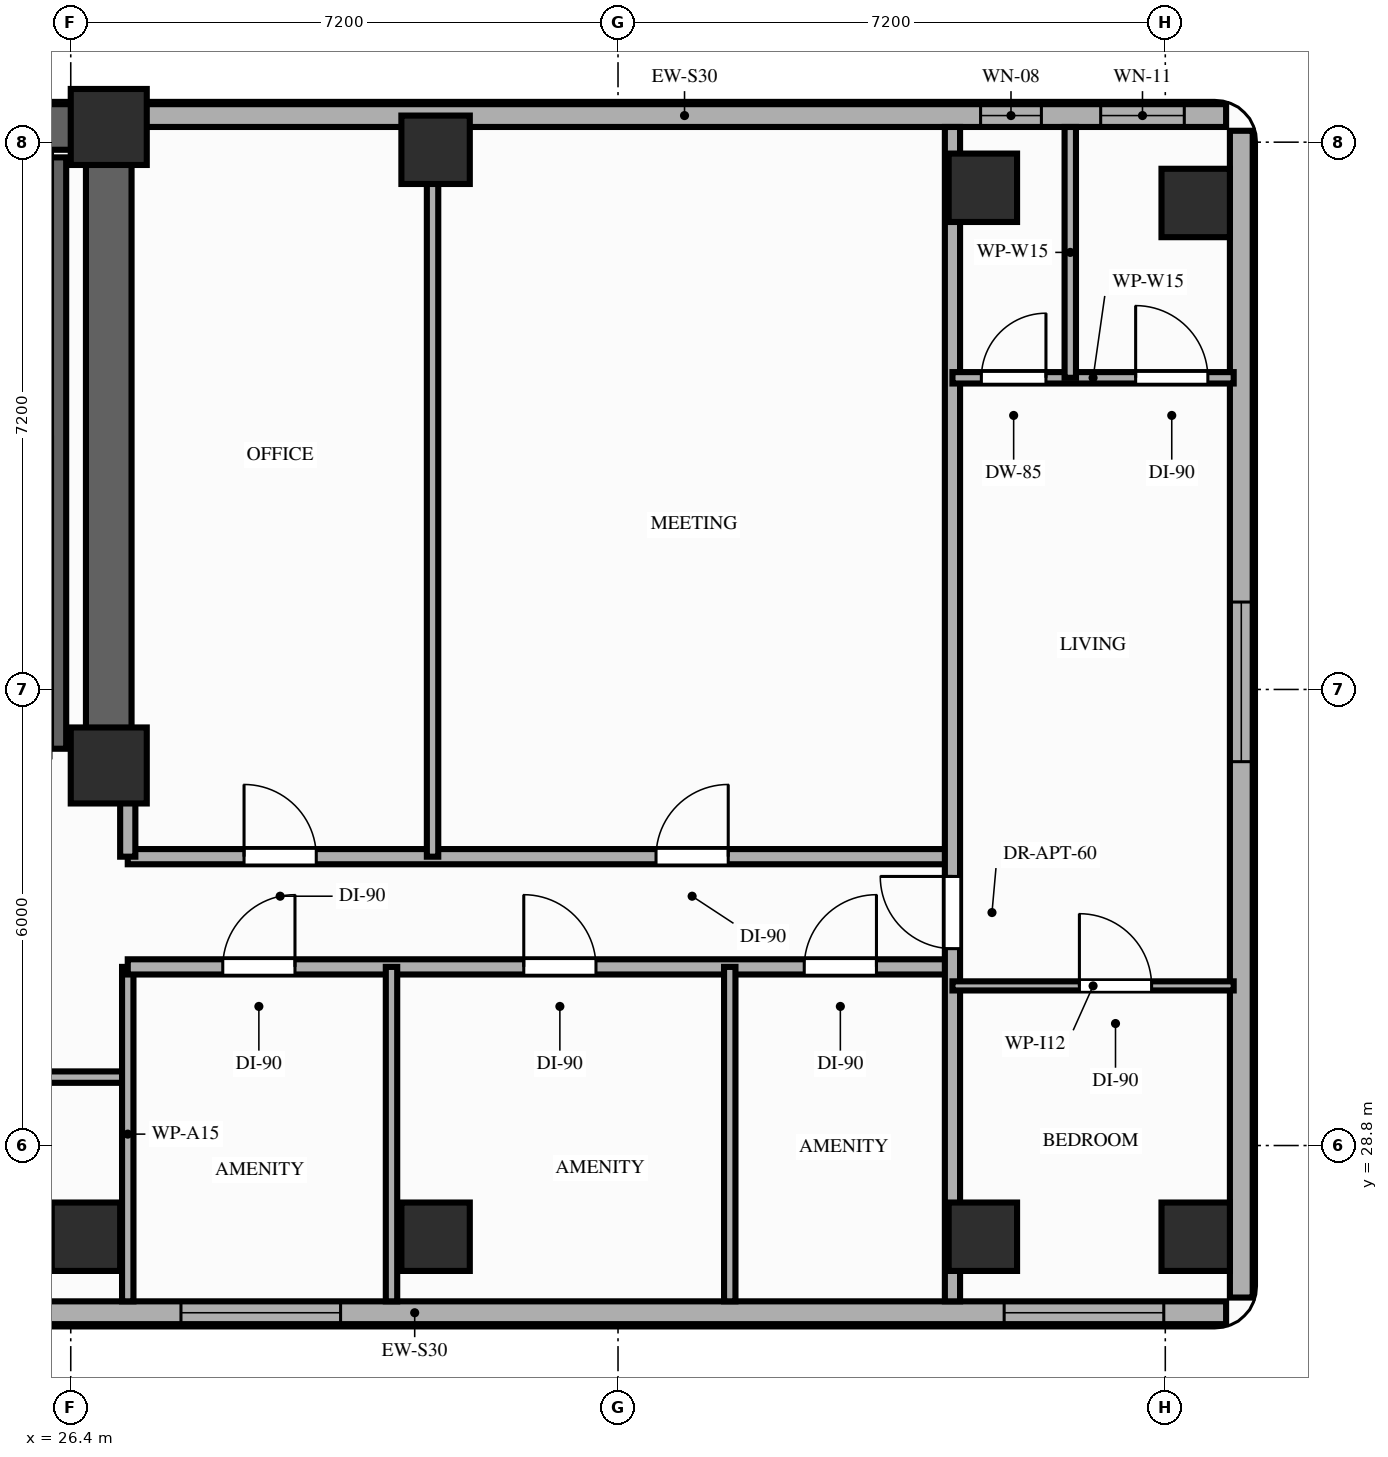
"""IFC4 building model, lengths in metres.
Left out: names, types, materials, properties, quantities, classifications, styles, units other than length and angle.
Written with IfcOpenShell. Run it as: python <this file> out.ifc"""

import sys

from ifc_helpers import new_model, si_unit, direction, frame, frame_2d, origin, origin_2d, place, context, subcontext, project, spatial, rectangle, extrude, element, fill, save


model = new_model("IFC4")
c1 = context("Model", 3, precision=1e-05, world=origin(), true_north=direction((0.0, 1.0)))
c2 = subcontext(c1, "Body", "Model", "MODEL_VIEW")
j1 = project(units=[si_unit("LENGTHUNIT", "METRE"), si_unit("PLANEANGLEUNIT", "RADIAN")], contexts=[c1])
p1 = place(None, origin())
s1 = spatial("IfcSite", under=j1, at=p1, CompositionType="ELEMENT")
p2 = place(p1, origin())
s2 = spatial("IfcBuilding", under=s1, at=p2, CompositionType="ELEMENT")
p3 = place(p2, frame((0.0, 0.0, 182.4)))
s3 = spatial("IfcBuildingStorey", under=s2, at=p3, CompositionType="ELEMENT", Elevation=182.4)
for number, where, z_axis, x_axis in (
    (1, (26.9, 33.8, 0.0), (0.0, 0.0, 1.0), (1.0, 0.0, 0.0)),
    (2, (26.9, 42.2, 0.0), (0.0, 0.0, 1.0), (1.0, 0.0, 0.0)),
):
    element("IfcColumn", number, at=place(p3, frame(where, z_axis=z_axis, x_axis=x_axis)), inside=s3, PredefinedType="COLUMN", context=c2, shape_type="SweptSolid", body=[
        extrude(rectangle(XDim=1.0, YDim=1.0, at=origin_2d()), origin(), (0.0, 0.0, 1.0), 3.2),
    ])
for number, where, z_axis, x_axis in (
    (3, (26.6, 27.6, 0.0), (0.0, 0.0, 1.0), (1.0, 0.0, 0.0)),
    (4, (31.2, 27.6, 0.0), (0.0, 0.0, 1.0), (1.0, 0.0, 0.0)),
    (5, (31.2, 41.9, 0.0), (0.0, 0.0, 1.0), (1.0, 0.0, 0.0)),
    (6, (38.4, 27.6, 0.0), (0.0, 0.0, 1.0), (1.0, 0.0, 0.0)),
    (7, (38.4, 41.4, 0.0), (0.0, 0.0, 1.0), (1.0, 0.0, 0.0)),
    (8, (41.2, 27.6, 0.0), (0.0, 0.0, 1.0), (1.0, 0.0, 0.0)),
    (9, (41.2, 41.2, 0.0), (0.0, 0.0, 1.0), (1.0, 0.0, 0.0)),
):
    element("IfcColumn", number, at=place(p3, frame(where, z_axis=z_axis, x_axis=x_axis)), inside=s3, PredefinedType="COLUMN", context=c2, shape_type="SweptSolid", body=[
        extrude(rectangle(XDim=0.9, YDim=0.9, at=origin_2d()), origin(), (0.0, 0.0, 1.0), 3.2),
    ])
p4 = place(p3, frame((41.6, 42.35, 0.0), z_axis=(0.0, 0.0, 1.0), x_axis=(-1.0, 0.0, 0.0)))
e10 = element("IfcWall", 10, at=p4, inside=s3, PredefinedType="STANDARD", context=c2, shape_type="SweptSolid", body=[
    extrude(rectangle(XDim=14.25, YDim=0.3, at=frame_2d((7.125, 0.0))), origin(), (0.0, 0.0, 1.0), 2.45),
])
p5 = place(p4, frame((2.43, 0.0, 0.85)))
e11 = element("IfcOpeningElement", 11, at=p5, cuts=e10, PredefinedType="OPENING", context=c2, shape_type="SweptSolid", body=[
    extrude(rectangle(XDim=0.8, YDim=1.35, at=frame_2d((0.4, 0.675))), frame((0.0, 0.16, 0.0), z_axis=(0.0, -1.0, 0.0), x_axis=(1.0, 0.0, 0.0)), (0.0, 0.0, 1.0), 0.32),
])
p6 = place(p4, frame((0.55, 0.0, 0.85)))
e12 = element("IfcOpeningElement", 12, at=p6, cuts=e10, PredefinedType="OPENING", context=c2, shape_type="SweptSolid", body=[
    extrude(rectangle(XDim=1.1, YDim=1.35, at=frame_2d((0.55, 0.675))), frame((0.0, 0.16, 0.0), z_axis=(0.0, -1.0, 0.0), x_axis=(1.0, 0.0, 0.0)), (0.0, 0.0, 1.0), 0.32),
])
p7 = place(p3, frame((20.25, 26.6, 0.0), z_axis=(0.0, 0.0, 1.0), x_axis=(1.0, 0.0, 0.0)))
e13 = element("IfcWall", 13, at=p7, inside=s3, PredefinedType="STANDARD", context=c2, shape_type="SweptSolid", body=[
    extrude(rectangle(XDim=21.35, YDim=0.3, at=frame_2d((10.675, 0.0))), origin(), (0.0, 0.0, 1.0), 2.71),
])
p8 = place(p7, frame((18.43, 0.0, 0.85)))
e14 = element("IfcOpeningElement", 14, at=p8, cuts=e13, PredefinedType="OPENING", context=c2, shape_type="SweptSolid", body=[
    extrude(rectangle(XDim=2.1, YDim=1.61, at=frame_2d((1.05, 0.805))), frame((0.0, 0.16, 0.0), z_axis=(0.0, -1.0, 0.0), x_axis=(1.0, 0.0, 0.0)), (0.0, 0.0, 1.0), 0.32),
])
p9 = place(p7, frame((2.1, 0.0, 0.85)))
e15 = element("IfcOpeningElement", 15, at=p9, cuts=e13, PredefinedType="OPENING", context=c2, shape_type="SweptSolid", body=[
    extrude(rectangle(XDim=2.1, YDim=1.61, at=frame_2d((1.05, 0.805))), frame((0.0, 0.16, 0.0), z_axis=(0.0, -1.0, 0.0), x_axis=(1.0, 0.0, 0.0)), (0.0, 0.0, 1.0), 0.32),
])
p10 = place(p7, frame((7.6, 0.0, 0.85)))
e16 = element("IfcOpeningElement", 16, at=p10, cuts=e13, PredefinedType="OPENING", context=c2, shape_type="SweptSolid", body=[
    extrude(rectangle(XDim=2.1, YDim=1.61, at=frame_2d((1.05, 0.805))), frame((0.0, 0.16, 0.0), z_axis=(0.0, -1.0, 0.0), x_axis=(1.0, 0.0, 0.0)), (0.0, 0.0, 1.0), 0.32),
])
p11 = place(p3, frame((41.8, 26.8, 0.0), z_axis=(0.0, 0.0, 1.0), x_axis=(0.0, 1.0, 0.0)))
e17 = element("IfcWall", 17, at=p11, inside=s3, PredefinedType="STANDARD", context=c2, shape_type="SweptSolid", body=[
    extrude(rectangle(XDim=15.35, YDim=0.3, at=frame_2d((7.675, 0.0))), origin(), (0.0, 0.0, 1.0), 3.02),
])
p12 = place(p11, frame((7.05, 0.0, 0.85)))
e18 = element("IfcOpeningElement", 18, at=p12, cuts=e17, PredefinedType="OPENING", context=c2, shape_type="SweptSolid", body=[
    extrude(rectangle(XDim=2.1, YDim=1.8, at=frame_2d((1.05, 0.9))), frame((0.0, 0.16, 0.0), z_axis=(0.0, -1.0, 0.0), x_axis=(1.0, 0.0, 0.0)), (0.0, 0.0, 1.0), 0.32),
])
p13 = place(p3, frame((6.45, 42.2, 0.0), z_axis=(0.0, 0.0, 1.0), x_axis=(1.0, 0.0, 0.0)))
e19 = element("IfcWall", 19, at=p13, inside=s3, PredefinedType="SHEAR", context=c2, shape_type="SweptSolid", body=[
    extrude(rectangle(XDim=20.45, YDim=0.6, at=frame_2d((10.225, 0.0))), origin(), (0.0, 0.0, 1.0), 3.02),
])
p14 = place(p3, frame((26.9, 33.8, 0.0), z_axis=(0.0, 0.0, 1.0), x_axis=(0.0, 1.0, 0.0)))
e20 = element("IfcWall", 20, at=p14, inside=s3, PredefinedType="SHEAR", context=c2, shape_type="SweptSolid", body=[
    extrude(rectangle(XDim=7.95, YDim=0.6, at=frame_2d((3.975, 0.0))), origin(), (0.0, 0.0, 1.0), 3.02),
])
p15 = place(p3, frame((26.24, 34.02, 0.0), z_axis=(0.0, 0.0, 1.0), x_axis=(0.0, 1.0, 0.0)))
e21 = element("IfcWall", 21, at=p15, inside=s3, PredefinedType="SHEAR", context=c2, shape_type="SweptSolid", body=[
    extrude(rectangle(XDim=7.78, YDim=0.2, at=frame_2d((3.89, 0.0))), origin(), (0.0, 0.0, 1.0), 3.02),
])
p16 = place(p3, frame((20.45, 29.7, 0.0), z_axis=(0.0, 0.0, 1.0), x_axis=(1.0, 0.0, 0.0)))
e22 = element("IfcWall", 22, at=p16, inside=s3, PredefinedType="PARTITIONING", context=c2, shape_type="SweptSolid", body=[
    extrude(rectangle(XDim=6.7, YDim=0.15, at=frame_2d((3.35, 0.0))), origin(), (0.0, 0.0, 1.0), 3.02),
])
p17 = place(p16, frame((2.8, 0.0, 0.0)))
e23 = element("IfcOpeningElement", 23, at=p17, cuts=e22, PredefinedType="OPENING", context=c2, shape_type="SweptSolid", body=[
    extrude(rectangle(XDim=0.95, YDim=2.15, at=frame_2d((0.475, 1.075))), frame((0.0, 0.085, 0.0), z_axis=(0.0, -1.0, 0.0), x_axis=(1.0, 0.0, 0.0)), (0.0, 0.0, 1.0), 0.17),
])
p18 = place(p3, frame((27.15, 26.75, 0.0), z_axis=(0.0, 0.0, 1.0), x_axis=(0.0, 1.0, 0.0)))
e24 = element("IfcWall", 24, at=p18, inside=s3, PredefinedType="PARTITIONING", context=c2, shape_type="SweptSolid", body=[
    extrude(rectangle(XDim=4.4, YDim=0.15, at=frame_2d((2.2, 0.0))), origin(), (0.0, 0.0, 1.0), 2.45),
])
p19 = place(p3, frame((27.15, 31.15, 0.0), z_axis=(0.0, 0.0, 1.0), x_axis=(1.0, 0.0, 0.0)))
e25 = element("IfcWall", 25, at=p19, inside=s3, PredefinedType="PARTITIONING", context=c2, shape_type="SweptSolid", body=[
    extrude(rectangle(XDim=10.85, YDim=0.2, at=frame_2d((5.425, 0.0))), origin(), (0.0, 0.0, 1.0), 2.45),
])
p20 = place(p19, frame((1.25, 0.0, 0.0)))
e26 = element("IfcOpeningElement", 26, at=p20, cuts=e25, PredefinedType="OPENING", context=c2, shape_type="SweptSolid", body=[
    extrude(rectangle(XDim=0.95, YDim=2.15, at=frame_2d((0.475, 1.075))), frame((0.0, 0.11, 0.0), z_axis=(0.0, -1.0, 0.0), x_axis=(1.0, 0.0, 0.0)), (0.0, 0.0, 1.0), 0.22),
])
p21 = place(p19, frame((5.21, 0.0, 0.0)))
e27 = element("IfcOpeningElement", 27, at=p21, cuts=e25, PredefinedType="OPENING", context=c2, shape_type="SweptSolid", body=[
    extrude(rectangle(XDim=0.95, YDim=2.15, at=frame_2d((0.475, 1.075))), frame((0.0, 0.11, 0.0), z_axis=(0.0, -1.0, 0.0), x_axis=(1.0, 0.0, 0.0)), (0.0, 0.0, 1.0), 0.22),
])
p22 = place(p19, frame((8.9, 0.0, 0.0)))
e28 = element("IfcOpeningElement", 28, at=p22, cuts=e25, PredefinedType="OPENING", context=c2, shape_type="SweptSolid", body=[
    extrude(rectangle(XDim=0.95, YDim=2.15, at=frame_2d((0.475, 1.075))), frame((0.0, 0.11, 0.0), z_axis=(0.0, -1.0, 0.0), x_axis=(1.0, 0.0, 0.0)), (0.0, 0.0, 1.0), 0.22),
])
p23 = place(p3, frame((27.15, 32.6, 0.0), z_axis=(0.0, 0.0, 1.0), x_axis=(1.0, 0.0, 0.0)))
e29 = element("IfcWall", 29, at=p23, inside=s3, PredefinedType="PARTITIONING", context=c2, shape_type="SweptSolid", body=[
    extrude(rectangle(XDim=10.85, YDim=0.2, at=frame_2d((5.425, 0.0))), origin(), (0.0, 0.0, 1.0), 2.45),
])
p24 = place(p23, frame((1.53, 0.0, 0.0)))
e30 = element("IfcOpeningElement", 30, at=p24, cuts=e29, PredefinedType="OPENING", context=c2, shape_type="SweptSolid", body=[
    extrude(rectangle(XDim=0.95, YDim=2.15, at=frame_2d((0.475, 1.075))), frame((0.0, 0.11, 0.0), z_axis=(0.0, -1.0, 0.0), x_axis=(1.0, 0.0, 0.0)), (0.0, 0.0, 1.0), 0.22),
])
p25 = place(p23, frame((6.95, 0.0, 0.0)))
e31 = element("IfcOpeningElement", 31, at=p25, cuts=e29, PredefinedType="OPENING", context=c2, shape_type="SweptSolid", body=[
    extrude(rectangle(XDim=0.95, YDim=2.15, at=frame_2d((0.475, 1.075))), frame((0.0, 0.11, 0.0), z_axis=(0.0, -1.0, 0.0), x_axis=(1.0, 0.0, 0.0)), (0.0, 0.0, 1.0), 0.22),
])
p26 = place(p3, frame((27.15, 32.6, 0.0), z_axis=(0.0, 0.0, 1.0), x_axis=(0.0, 1.0, 0.0)))
e32 = element("IfcWall", 32, at=p26, inside=s3, PredefinedType="PARTITIONING", context=c2, shape_type="SweptSolid", body=[
    extrude(rectangle(XDim=1.08, YDim=0.2, at=frame_2d((0.54, 0.0))), origin(), (0.0, 0.0, 1.0), 2.45),
])
p27 = place(p3, frame((38.0, 26.75, 0.0), z_axis=(0.0, 0.0, 1.0), x_axis=(0.0, 1.0, 0.0)))
e33 = element("IfcWall", 33, at=p27, inside=s3, PredefinedType="PARTITIONING", context=c2, shape_type="SweptSolid", body=[
    extrude(rectangle(XDim=15.45, YDim=0.2, at=frame_2d((7.725, 0.0))), origin(), (0.0, 0.0, 1.0), 2.45),
])
p28 = place(p27, frame((4.64, 0.0, 0.0)))
e34 = element("IfcOpeningElement", 34, at=p28, cuts=e33, PredefinedType="OPENING", context=c2, shape_type="SweptSolid", body=[
    extrude(rectangle(XDim=0.95, YDim=2.15, at=frame_2d((0.475, 1.075))), frame((0.0, 0.11, 0.0), z_axis=(0.0, -1.0, 0.0), x_axis=(1.0, 0.0, 0.0)), (0.0, 0.0, 1.0), 0.22),
])
p29 = place(p3, frame((38.0, 30.9, 0.0), z_axis=(0.0, 0.0, 1.0), x_axis=(1.0, 0.0, 0.0)))
e35 = element("IfcWall", 35, at=p29, inside=s3, PredefinedType="PARTITIONING", context=c2, shape_type="SweptSolid", body=[
    extrude(rectangle(XDim=3.7, YDim=0.12, at=frame_2d((1.85, 0.0))), origin(), (0.0, 0.0, 1.0), 2.45),
])
p30 = place(p29, frame((1.67, 0.0, 0.0)))
e36 = element("IfcOpeningElement", 36, at=p30, cuts=e35, PredefinedType="OPENING", context=c2, shape_type="SweptSolid", body=[
    extrude(rectangle(XDim=0.95, YDim=2.15, at=frame_2d((0.475, 1.075))), frame((0.0, 0.07, 0.0), z_axis=(0.0, -1.0, 0.0), x_axis=(1.0, 0.0, 0.0)), (0.0, 0.0, 1.0), 0.14),
])
p31 = place(p3, frame((38.0, 38.9, 0.0), z_axis=(0.0, 0.0, 1.0), x_axis=(1.0, 0.0, 0.0)))
e37 = element("IfcWall", 37, at=p31, inside=s3, PredefinedType="PARTITIONING", context=c2, shape_type="SweptSolid", body=[
    extrude(rectangle(XDim=3.7, YDim=0.15, at=frame_2d((1.85, 0.0))), origin(), (0.0, 0.0, 1.0), 2.45),
])
p32 = place(p31, frame((0.38, 0.0, 0.0)))
e38 = element("IfcOpeningElement", 38, at=p32, cuts=e37, PredefinedType="OPENING", context=c2, shape_type="SweptSolid", body=[
    extrude(rectangle(XDim=0.85, YDim=2.1, at=frame_2d((0.425, 1.05))), frame((0.0, 0.085, 0.0), z_axis=(0.0, -1.0, 0.0), x_axis=(1.0, 0.0, 0.0)), (0.0, 0.0, 1.0), 0.17),
])
p33 = place(p31, frame((2.41, 0.0, 0.0)))
e39 = element("IfcOpeningElement", 39, at=p33, cuts=e37, PredefinedType="OPENING", context=c2, shape_type="SweptSolid", body=[
    extrude(rectangle(XDim=0.95, YDim=2.15, at=frame_2d((0.475, 1.075))), frame((0.0, 0.085, 0.0), z_axis=(0.0, -1.0, 0.0), x_axis=(1.0, 0.0, 0.0)), (0.0, 0.0, 1.0), 0.17),
])
p34 = place(p3, frame((39.55, 38.9, 0.0), z_axis=(0.0, 0.0, 1.0), x_axis=(0.0, 1.0, 0.0)))
e40 = element("IfcWall", 40, at=p34, inside=s3, PredefinedType="PARTITIONING", context=c2, shape_type="SweptSolid", body=[
    extrude(rectangle(XDim=3.3, YDim=0.15, at=frame_2d((1.65, 0.0))), origin(), (0.0, 0.0, 1.0), 2.45),
])
for number, where, z_axis, x_axis in (
    (41, (30.62, 26.75, 0.0), (0.0, 0.0, 1.0), (0.0, 1.0, 0.0)),
    (42, (35.07, 26.75, 0.0), (0.0, 0.0, 1.0), (0.0, 1.0, 0.0)),
):
    element("IfcWall", number, at=place(p3, frame(where, z_axis=z_axis, x_axis=x_axis)), inside=s3, PredefinedType="PARTITIONING", context=c2, shape_type="SweptSolid", body=[
        extrude(rectangle(XDim=4.4, YDim=0.15, at=frame_2d((2.2, 0.0))), origin(), (0.0, 0.0, 1.0), 2.45),
    ])
p35 = place(p3, frame((31.16, 32.6, 0.0), z_axis=(0.0, 0.0, 1.0), x_axis=(0.0, 1.0, 0.0)))
e43 = element("IfcWall", 43, at=p35, inside=s3, PredefinedType="PARTITIONING", context=c2, shape_type="SweptSolid", body=[
    extrude(rectangle(XDim=9.6, YDim=0.15, at=frame_2d((4.8, 0.0))), origin(), (0.0, 0.0, 1.0), 2.45),
])
p36 = place(p12, origin())
e44 = element("IfcWindow", 44, at=p36, inside=s3, PartitioningType="SINGLE_PANEL", PredefinedType="WINDOW", context=c2, shape_type="SweptSolid", body=[
    extrude(rectangle(XDim=2.1, YDim=1.8, at=frame_2d((1.05, 0.9))), frame((0.0, 0.03, 0.0), z_axis=(0.0, -1.0, 0.0), x_axis=(1.0, 0.0, 0.0)), (0.0, 0.0, 1.0), 0.06),
])
fill(e18, e44)
p37 = place(p8, origin())
e45 = element("IfcWindow", 45, at=p37, inside=s3, PartitioningType="SINGLE_PANEL", PredefinedType="WINDOW", context=c2, shape_type="SweptSolid", body=[
    extrude(rectangle(XDim=2.1, YDim=1.61, at=frame_2d((1.05, 0.805))), frame((0.0, 0.03, 0.0), z_axis=(0.0, -1.0, 0.0), x_axis=(1.0, 0.0, 0.0)), (0.0, 0.0, 1.0), 0.06),
])
fill(e14, e45)
p38 = place(p5, origin())
e46 = element("IfcWindow", 46, at=p38, inside=s3, PartitioningType="SINGLE_PANEL", PredefinedType="WINDOW", context=c2, shape_type="SweptSolid", body=[
    extrude(rectangle(XDim=0.8, YDim=1.35, at=frame_2d((0.4, 0.675))), frame((0.0, 0.03, 0.0), z_axis=(0.0, -1.0, 0.0), x_axis=(1.0, 0.0, 0.0)), (0.0, 0.0, 1.0), 0.06),
])
fill(e11, e46)
p39 = place(p6, origin())
e47 = element("IfcWindow", 47, at=p39, inside=s3, PartitioningType="SINGLE_PANEL", PredefinedType="WINDOW", context=c2, shape_type="SweptSolid", body=[
    extrude(rectangle(XDim=1.1, YDim=1.35, at=frame_2d((0.55, 0.675))), frame((0.0, 0.03, 0.0), z_axis=(0.0, -1.0, 0.0), x_axis=(1.0, 0.0, 0.0)), (0.0, 0.0, 1.0), 0.06),
])
fill(e12, e47)
p40 = place(p10, origin())
e48 = element("IfcWindow", 48, at=p40, inside=s3, PartitioningType="SINGLE_PANEL", PredefinedType="WINDOW", context=c2, shape_type="SweptSolid", body=[
    extrude(rectangle(XDim=2.1, YDim=1.61, at=frame_2d((1.05, 0.805))), frame((0.0, 0.03, 0.0), z_axis=(0.0, -1.0, 0.0), x_axis=(1.0, 0.0, 0.0)), (0.0, 0.0, 1.0), 0.06),
])
fill(e16, e48)
p41 = place(p28, origin())
e49 = element("IfcDoor", 49, at=p41, inside=s3, OperationType="SINGLE_SWING_RIGHT", PredefinedType="DOOR", context=c2, shape_type="SweptSolid", body=[
    extrude(rectangle(XDim=0.95, YDim=2.15, at=frame_2d((0.475, 1.075))), frame((0.0, 0.025, 0.0), z_axis=(0.0, -1.0, 0.0), x_axis=(1.0, 0.0, 0.0)), (0.0, 0.0, 1.0), 0.05),
])
fill(e34, e49)
p42 = place(p30, origin())
e50 = element("IfcDoor", 50, at=p42, inside=s3, OperationType="SINGLE_SWING_LEFT", PredefinedType="DOOR", context=c2, shape_type="SweptSolid", body=[
    extrude(rectangle(XDim=0.95, YDim=2.15, at=frame_2d((0.475, 1.075))), frame((0.0, 0.025, 0.0), z_axis=(0.0, -1.0, 0.0), x_axis=(1.0, 0.0, 0.0)), (0.0, 0.0, 1.0), 0.05),
])
fill(e36, e50)
p43 = place(p32, origin())
e51 = element("IfcDoor", 51, at=p43, inside=s3, OperationType="SINGLE_SWING_RIGHT", PredefinedType="DOOR", context=c2, shape_type="SweptSolid", body=[
    extrude(rectangle(XDim=0.85, YDim=2.1, at=frame_2d((0.425, 1.05))), frame((0.0, 0.025, 0.0), z_axis=(0.0, -1.0, 0.0), x_axis=(1.0, 0.0, 0.0)), (0.0, 0.0, 1.0), 0.05),
])
fill(e38, e51)
p44 = place(p33, origin())
e52 = element("IfcDoor", 52, at=p44, inside=s3, OperationType="SINGLE_SWING_LEFT", PredefinedType="DOOR", context=c2, shape_type="SweptSolid", body=[
    extrude(rectangle(XDim=0.95, YDim=2.15, at=frame_2d((0.475, 1.075))), frame((0.0, 0.025, 0.0), z_axis=(0.0, -1.0, 0.0), x_axis=(1.0, 0.0, 0.0)), (0.0, 0.0, 1.0), 0.05),
])
fill(e39, e52)
p45 = place(p20, origin())
e53 = element("IfcDoor", 53, at=p45, inside=s3, OperationType="SINGLE_SWING_RIGHT", PredefinedType="DOOR", context=c2, shape_type="SweptSolid", body=[
    extrude(rectangle(XDim=0.95, YDim=2.15, at=frame_2d((0.475, 1.075))), frame((0.0, 0.025, 0.0), z_axis=(0.0, -1.0, 0.0), x_axis=(1.0, 0.0, 0.0)), (0.0, 0.0, 1.0), 0.05),
])
fill(e26, e53)
p46 = place(p21, origin())
e54 = element("IfcDoor", 54, at=p46, inside=s3, OperationType="SINGLE_SWING_LEFT", PredefinedType="DOOR", context=c2, shape_type="SweptSolid", body=[
    extrude(rectangle(XDim=0.95, YDim=2.15, at=frame_2d((0.475, 1.075))), frame((0.0, 0.025, 0.0), z_axis=(0.0, -1.0, 0.0), x_axis=(1.0, 0.0, 0.0)), (0.0, 0.0, 1.0), 0.05),
])
fill(e27, e54)
p47 = place(p22, origin())
e55 = element("IfcDoor", 55, at=p47, inside=s3, OperationType="SINGLE_SWING_RIGHT", PredefinedType="DOOR", context=c2, shape_type="SweptSolid", body=[
    extrude(rectangle(XDim=0.95, YDim=2.15, at=frame_2d((0.475, 1.075))), frame((0.0, 0.025, 0.0), z_axis=(0.0, -1.0, 0.0), x_axis=(1.0, 0.0, 0.0)), (0.0, 0.0, 1.0), 0.05),
])
fill(e28, e55)
p48 = place(p24, origin())
e56 = element("IfcDoor", 56, at=p48, inside=s3, OperationType="SINGLE_SWING_LEFT", PredefinedType="DOOR", context=c2, shape_type="SweptSolid", body=[
    extrude(rectangle(XDim=0.95, YDim=2.15, at=frame_2d((0.475, 1.075))), frame((0.0, 0.025, 0.0), z_axis=(0.0, -1.0, 0.0), x_axis=(1.0, 0.0, 0.0)), (0.0, 0.0, 1.0), 0.05),
])
fill(e30, e56)
p49 = place(p25, origin())
e57 = element("IfcDoor", 57, at=p49, inside=s3, OperationType="SINGLE_SWING_RIGHT", PredefinedType="DOOR", context=c2, shape_type="SweptSolid", body=[
    extrude(rectangle(XDim=0.95, YDim=2.15, at=frame_2d((0.475, 1.075))), frame((0.0, 0.025, 0.0), z_axis=(0.0, -1.0, 0.0), x_axis=(1.0, 0.0, 0.0)), (0.0, 0.0, 1.0), 0.05),
])
fill(e31, e57)
save(model, sys.argv[1])
